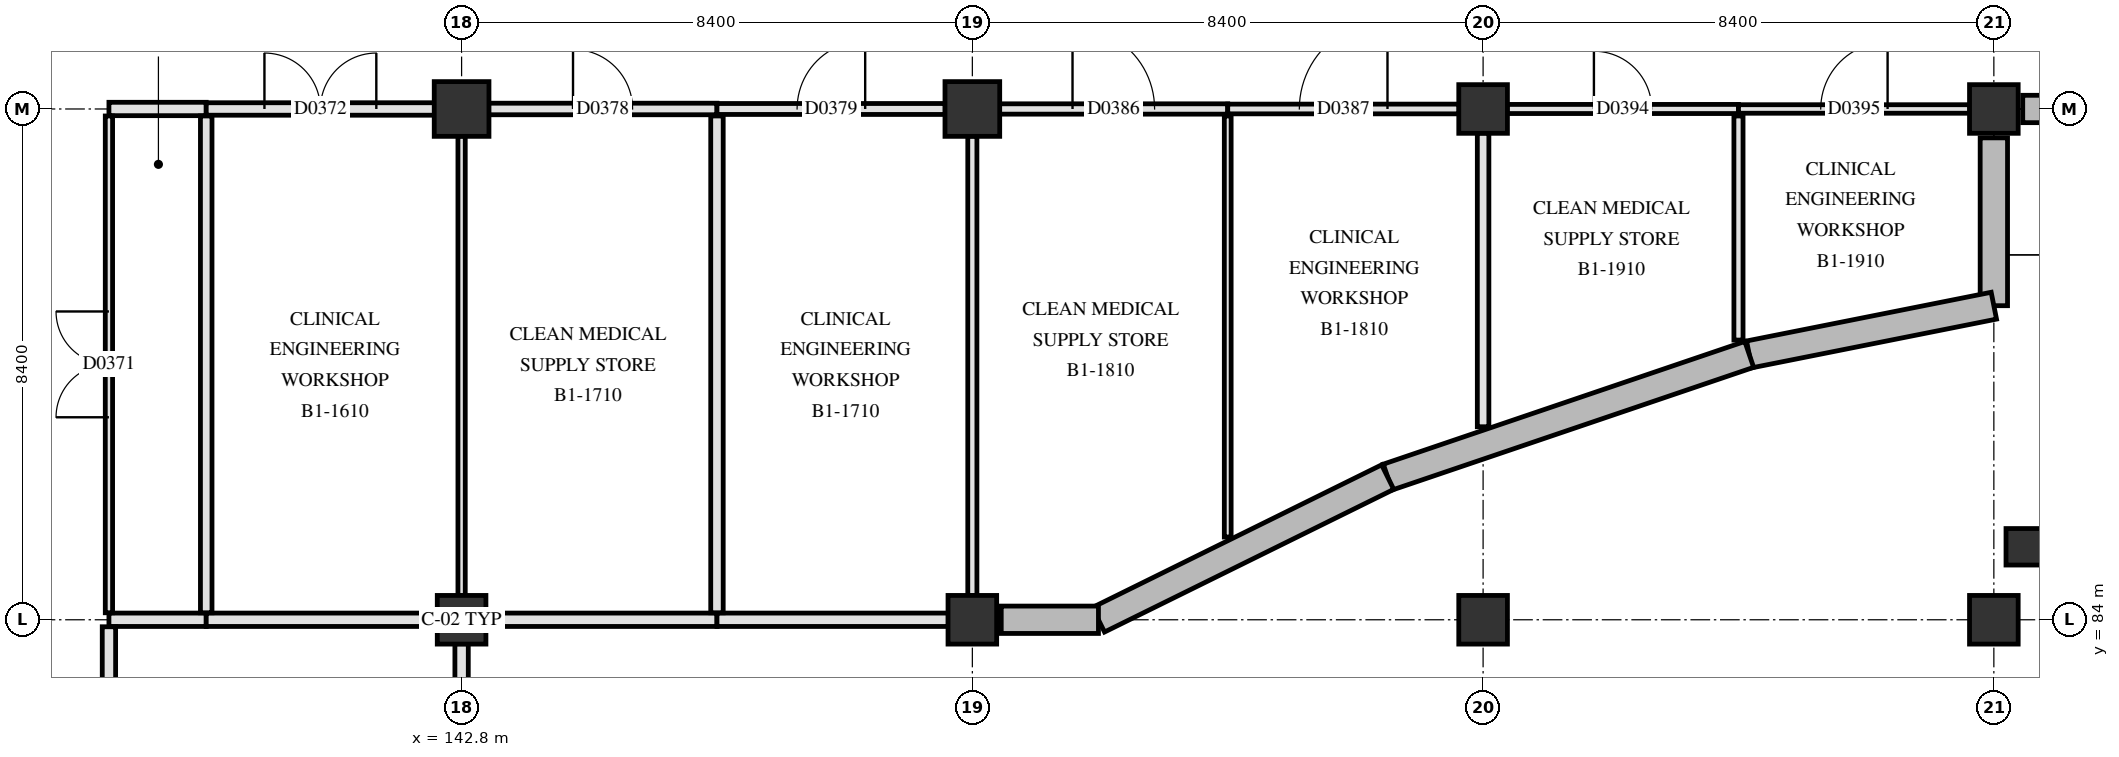
"""IFC4 building model, lengths in metres.
Left out: names, types, materials, properties, quantities, classifications, styles, units other than length and angle.
Written with IfcOpenShell. Run it as: python <this file> out.ifc"""

import sys

from ifc_helpers import new_model, si_unit, direction, frame, frame_2d, origin, origin_2d, place, context, subcontext, project, spatial, rectangle, extrude, element, fill, save


model = new_model("IFC4")
c1 = context("Model", 3, precision=1e-05, world=origin(), true_north=direction((0.0, 1.0)))
c2 = subcontext(c1, "Body", "Model", "MODEL_VIEW")
j1 = project(units=[si_unit("LENGTHUNIT", "METRE"), si_unit("PLANEANGLEUNIT", "RADIAN")], contexts=[c1])
p1 = place(None, origin())
s1 = spatial("IfcSite", under=j1, at=p1, CompositionType="ELEMENT")
p2 = place(p1, origin())
s2 = spatial("IfcBuilding", under=s1, at=p2, CompositionType="ELEMENT")
p3 = place(p2, frame((0.0, 0.0, -5.4)))
s3 = spatial("IfcBuildingStorey", under=s2, at=p3, CompositionType="ELEMENT", Elevation=-5.4)
p4 = place(p3, frame((142.8, 84.0, 0.0), z_axis=(0.0, 0.0, 1.0), x_axis=(1.0, 0.0, 0.0)))
e1 = element("IfcColumn", 1, at=p4, inside=s3, PredefinedType="COLUMN", context=c2, shape_type="SweptSolid", body=[
    extrude(rectangle(XDim=0.8, YDim=0.8, at=origin_2d()), origin(), (0.0, 0.0, 1.0), 5.4),
])
p5 = place(p3, frame((142.8, 92.4, 0.0), z_axis=(0.0, 0.0, 1.0), x_axis=(1.0, 0.0, 0.0)))
e2 = element("IfcColumn", 2, at=p5, inside=s3, PredefinedType="COLUMN", context=c2, shape_type="SweptSolid", body=[
    extrude(rectangle(XDim=0.9, YDim=0.9, at=origin_2d()), origin(), (0.0, 0.0, 1.0), 5.4),
])
p6 = place(p3, frame((151.2, 84.0, 0.0), z_axis=(0.0, 0.0, 1.0), x_axis=(1.0, 0.0, 0.0)))
e3 = element("IfcColumn", 3, at=p6, inside=s3, PredefinedType="COLUMN", context=c2, shape_type="SweptSolid", body=[
    extrude(rectangle(XDim=0.8, YDim=0.8, at=origin_2d()), origin(), (0.0, 0.0, 1.0), 5.4),
])
p7 = place(p3, frame((151.2, 92.4, 0.0), z_axis=(0.0, 0.0, 1.0), x_axis=(1.0, 0.0, 0.0)))
e4 = element("IfcColumn", 4, at=p7, inside=s3, PredefinedType="COLUMN", context=c2, shape_type="SweptSolid", body=[
    extrude(rectangle(XDim=0.9, YDim=0.9, at=origin_2d()), origin(), (0.0, 0.0, 1.0), 5.4),
])
for number, where, z_axis, x_axis in (
    (5, (159.6, 84.0, 0.0), (0.0, 0.0, 1.0), (1.0, 0.0, 0.0)),
    (6, (159.6, 92.4, 0.0), (0.0, 0.0, 1.0), (1.0, 0.0, 0.0)),
    (7, (168.0, 84.0, 0.0), (0.0, 0.0, 1.0), (1.0, 0.0, 0.0)),
    (8, (168.0, 92.4, 0.0), (0.0, 0.0, 1.0), (1.0, 0.0, 0.0)),
):
    element("IfcColumn", number, at=place(p3, frame(where, z_axis=z_axis, x_axis=x_axis)), inside=s3, PredefinedType="COLUMN", context=c2, shape_type="SweptSolid", body=[
        extrude(rectangle(XDim=0.8, YDim=0.8, at=origin_2d()), origin(), (0.0, 0.0, 1.0), 5.4),
    ])
p8 = place(p3, frame((175.925, 92.4, 0.0), z_axis=(0.0, 0.0, 1.0), x_axis=(-1.0, 0.0, 0.0)))
e9 = element("IfcWall", 9, at=p8, inside=s3, PredefinedType="SOLIDWALL", context=c2, shape_type="SweptSolid", body=[
    extrude(rectangle(XDim=7.45, YDim=0.45, at=frame_2d((3.725, 0.0))), origin(), (0.0, 0.0, 1.0), 5.08),
])
p9 = place(p3, frame((168.0, 91.925, 0.0), z_axis=(0.0, 0.0, 1.0), x_axis=(0.0, -1.0, 0.0)))
e10 = element("IfcWall", 10, at=p9, inside=s3, PredefinedType="SOLIDWALL", context=c2, shape_type="SweptSolid", body=[
    extrude(rectangle(XDim=2.76, YDim=0.45, at=frame_2d((1.38, 0.0))), origin(), (0.0, 0.0, 1.0), 5.08),
])
p10 = place(p3, frame((168.0, 89.165, 0.0), z_axis=(0.0, 0.0, 1.0), x_axis=(-0.980747429611, -0.195280514416, 0.0)))
e11 = element("IfcWall", 11, at=p10, inside=s3, PredefinedType="SOLIDWALL", context=c2, shape_type="SweptSolid", body=[
    extrude(rectangle(XDim=4.102, YDim=0.45, at=frame_2d((2.051, 0.0))), origin(), (0.0, 0.0, 1.0), 5.08),
])
p11 = place(p3, frame((163.977, 88.364, 0.0), z_axis=(0.0, 0.0, 1.0), x_axis=(-0.946946796994, -0.321390360253, 0.0)))
e12 = element("IfcWall", 12, at=p11, inside=s3, PredefinedType="SOLIDWALL", context=c2, shape_type="SweptSolid", body=[
    extrude(rectangle(XDim=6.279, YDim=0.45, at=frame_2d((3.14, 0.0))), origin(), (0.0, 0.0, 1.0), 5.08),
])
p12 = place(p3, frame((158.031, 86.346, 0.0), z_axis=(0.0, 0.0, 1.0), x_axis=(-0.896871620933, -0.442290962563, 0.0)))
e13 = element("IfcWall", 13, at=p12, inside=s3, PredefinedType="SOLIDWALL", context=c2, shape_type="SweptSolid", body=[
    extrude(rectangle(XDim=5.304, YDim=0.45, at=frame_2d((2.652, 0.0))), origin(), (0.0, 0.0, 1.0), 5.08),
])
p13 = place(p3, frame((153.274, 84.0, 0.0), z_axis=(0.0, 0.0, 1.0), x_axis=(-1.0, 0.0, 0.0)))
e14 = element("IfcWall", 14, at=p13, inside=s3, PredefinedType="SOLIDWALL", context=c2, shape_type="SweptSolid", body=[
    extrude(rectangle(XDim=1.599, YDim=0.45, at=frame_2d((0.799, 0.0))), origin(), (0.0, 0.0, 1.0), 5.08),
])
p14 = place(p3, frame((168.5, 85.2, 0.0), z_axis=(0.0, 0.0, 1.0), x_axis=(1.0, 0.0, 0.0)))
e15 = element("IfcColumn", 15, at=p14, inside=s3, PredefinedType="COLUMN", context=c2, shape_type="SweptSolid", body=[
    extrude(rectangle(XDim=0.6, YDim=0.6, at=origin_2d()), origin(), (0.0, 0.0, 1.0), 5.09),
])
p15 = place(p3, frame((137.0, 84.0, 0.0), z_axis=(0.0, 0.0, 1.0), x_axis=(1.0, 0.0, 0.0)))
e16 = element("IfcWall", 16, at=p15, inside=s3, PredefinedType="PARTITIONING", context=c2, shape_type="SweptSolid", body=[
    extrude(rectangle(XDim=1.6, YDim=0.22, at=frame_2d((0.8, 0.0))), origin(), (0.0, 0.0, 1.0), 4.42),
])
for number, where, z_axis, x_axis in (
    (17, (138.6, 84.0, 0.0), (0.0, 0.0, 1.0), (1.0, 0.0, 0.0)),
    (18, (143.195, 84.0, 0.0), (0.0, 0.0, 1.0), (1.0, 0.0, 0.0)),
    (19, (147.0, 84.0, 0.0), (0.0, 0.0, 1.0), (1.0, 0.0, 0.0)),
):
    element("IfcWall", number, at=place(p3, frame(where, z_axis=z_axis, x_axis=x_axis)), inside=s3, PredefinedType="PARTITIONING", context=c2, shape_type="SweptSolid", body=[
        extrude(rectangle(XDim=3.805, YDim=0.22, at=frame_2d((1.902, 0.0))), origin(), (0.0, 0.0, 1.0), 4.42),
    ])
p16 = place(p3, frame((137.0, 92.4, 0.0), z_axis=(0.0, 0.0, 1.0), x_axis=(1.0, 0.0, 0.0)))
e20 = element("IfcWall", 20, at=p16, inside=s3, PredefinedType="PARTITIONING", context=c2, shape_type="SweptSolid", body=[
    extrude(rectangle(XDim=1.6, YDim=0.22, at=frame_2d((0.8, 0.0))), origin(), (0.0, 0.0, 1.0), 4.42),
])
p17 = place(p3, frame((138.6, 92.4, 0.0), z_axis=(0.0, 0.0, 1.0), x_axis=(1.0, 0.0, 0.0)))
e21 = element("IfcWall", 21, at=p17, inside=s3, PredefinedType="PARTITIONING", context=c2, shape_type="SweptSolid", body=[
    extrude(rectangle(XDim=3.755, YDim=0.205, at=frame_2d((1.877, 0.0))), origin(), (0.0, 0.0, 1.0), 4.42),
])
p18 = place(p17, frame((0.958, 0.0, 0.0)))
e22 = element("IfcOpeningElement", 22, at=p18, cuts=e21, PredefinedType="OPENING", context=c2, shape_type="SweptSolid", body=[
    extrude(rectangle(XDim=1.84, YDim=2.28, at=frame_2d((0.92, 1.14))), frame((0.0, 0.113, 0.0), z_axis=(0.0, -1.0, 0.0), x_axis=(1.0, 0.0, 0.0)), (0.0, 0.0, 1.0), 0.225),
])
p19 = place(p3, frame((143.245, 92.4, 0.0), z_axis=(0.0, 0.0, 1.0), x_axis=(1.0, 0.0, 0.0)))
e23 = element("IfcWall", 23, at=p19, inside=s3, PredefinedType="PARTITIONING", context=c2, shape_type="SweptSolid", body=[
    extrude(rectangle(XDim=3.755, YDim=0.19, at=frame_2d((1.877, 0.0))), origin(), (0.0, 0.0, 1.0), 4.42),
])
p20 = place(p19, frame((1.387, 0.0, 0.0)))
e24 = element("IfcOpeningElement", 24, at=p20, cuts=e23, PredefinedType="OPENING", context=c2, shape_type="SweptSolid", body=[
    extrude(rectangle(XDim=0.98, YDim=2.12, at=frame_2d((0.49, 1.06))), frame((0.0, 0.105, 0.0), z_axis=(0.0, -1.0, 0.0), x_axis=(1.0, 0.0, 0.0)), (0.0, 0.0, 1.0), 0.21),
])
p21 = place(p3, frame((147.0, 92.4, 0.0), z_axis=(0.0, 0.0, 1.0), x_axis=(1.0, 0.0, 0.0)))
e25 = element("IfcWall", 25, at=p21, inside=s3, PredefinedType="PARTITIONING", context=c2, shape_type="SweptSolid", body=[
    extrude(rectangle(XDim=3.755, YDim=0.18, at=frame_2d((1.877, 0.0))), origin(), (0.0, 0.0, 1.0), 4.42),
])
p22 = place(p21, frame((1.317, 0.0, 0.0)))
e26 = element("IfcOpeningElement", 26, at=p22, cuts=e25, PredefinedType="OPENING", context=c2, shape_type="SweptSolid", body=[
    extrude(rectangle(XDim=1.12, YDim=2.18, at=frame_2d((0.56, 1.09))), frame((0.0, 0.1, 0.0), z_axis=(0.0, -1.0, 0.0), x_axis=(1.0, 0.0, 0.0)), (0.0, 0.0, 1.0), 0.2),
])
p23 = place(p3, frame((151.645, 92.4, 0.0), z_axis=(0.0, 0.0, 1.0), x_axis=(1.0, 0.0, 0.0)))
e27 = element("IfcWall", 27, at=p23, inside=s3, PredefinedType="PARTITIONING", context=c2, shape_type="SweptSolid", body=[
    extrude(rectangle(XDim=3.755, YDim=0.17, at=frame_2d((1.877, 0.0))), origin(), (0.0, 0.0, 1.0), 4.42),
])
p24 = place(p23, frame((1.202, 0.0, 0.0)))
e28 = element("IfcOpeningElement", 28, at=p24, cuts=e27, PredefinedType="OPENING", context=c2, shape_type="SweptSolid", body=[
    extrude(rectangle(XDim=1.35, YDim=2.2, at=frame_2d((0.675, 1.1))), frame((0.0, 0.095, 0.0), z_axis=(0.0, -1.0, 0.0), x_axis=(1.0, 0.0, 0.0)), (0.0, 0.0, 1.0), 0.19),
])
p25 = place(p3, frame((155.4, 92.4, 0.0), z_axis=(0.0, 0.0, 1.0), x_axis=(1.0, 0.0, 0.0)))
e29 = element("IfcWall", 29, at=p25, inside=s3, PredefinedType="PARTITIONING", context=c2, shape_type="SweptSolid", body=[
    extrude(rectangle(XDim=3.805, YDim=0.16, at=frame_2d((1.903, 0.0))), origin(), (0.0, 0.0, 1.0), 4.42),
])
p26 = place(p25, frame((1.177, 0.0, 0.0)))
e30 = element("IfcOpeningElement", 30, at=p26, cuts=e29, PredefinedType="OPENING", context=c2, shape_type="SweptSolid", body=[
    extrude(rectangle(XDim=1.45, YDim=2.2, at=frame_2d((0.725, 1.1))), frame((0.0, 0.09, 0.0), z_axis=(0.0, -1.0, 0.0), x_axis=(1.0, 0.0, 0.0)), (0.0, 0.0, 1.0), 0.18),
])
p27 = place(p3, frame((159.995, 92.4, 0.0), z_axis=(0.0, 0.0, 1.0), x_axis=(1.0, 0.0, 0.0)))
e31 = element("IfcWall", 31, at=p27, inside=s3, PredefinedType="PARTITIONING", context=c2, shape_type="SweptSolid", body=[
    extrude(rectangle(XDim=3.805, YDim=0.15, at=frame_2d((1.902, 0.0))), origin(), (0.0, 0.0, 1.0), 4.42),
])
p28 = place(p27, frame((1.427, 0.0, 0.0)))
e32 = element("IfcOpeningElement", 32, at=p28, cuts=e31, PredefinedType="OPENING", context=c2, shape_type="SweptSolid", body=[
    extrude(rectangle(XDim=0.95, YDim=2.1, at=frame_2d((0.475, 1.05))), frame((0.0, 0.085, 0.0), z_axis=(0.0, -1.0, 0.0), x_axis=(1.0, 0.0, 0.0)), (0.0, 0.0, 1.0), 0.17),
])
p29 = place(p3, frame((163.8, 92.4, 0.0), z_axis=(0.0, 0.0, 1.0), x_axis=(1.0, 0.0, 0.0)))
e33 = element("IfcWall", 33, at=p29, inside=s3, PredefinedType="PARTITIONING", context=c2, shape_type="SweptSolid", body=[
    extrude(rectangle(XDim=3.805, YDim=0.14, at=frame_2d((1.902, 0.0))), origin(), (0.0, 0.0, 1.0), 4.42),
])
p30 = place(p29, frame((1.353, 0.0, 0.0)))
e34 = element("IfcOpeningElement", 34, at=p30, cuts=e33, PredefinedType="OPENING", context=c2, shape_type="SweptSolid", body=[
    extrude(rectangle(XDim=1.1, YDim=2.15, at=frame_2d((0.55, 1.075))), frame((0.0, 0.08, 0.0), z_axis=(0.0, -1.0, 0.0), x_axis=(1.0, 0.0, 0.0)), (0.0, 0.0, 1.0), 0.16),
])
p31 = place(p3, frame((137.0, 78.315, 0.0), z_axis=(0.0, 0.0, 1.0), x_axis=(0.0, 1.0, 0.0)))
e35 = element("IfcWall", 35, at=p31, inside=s3, PredefinedType="PARTITIONING", context=c2, shape_type="SweptSolid", body=[
    extrude(rectangle(XDim=5.57, YDim=0.22, at=frame_2d((2.785, 0.0))), origin(), (0.0, 0.0, 1.0), 4.42),
])
p32 = place(p3, frame((137.0, 84.115, 0.0), z_axis=(0.0, 0.0, 1.0), x_axis=(0.0, 1.0, 0.0)))
e36 = element("IfcWall", 36, at=p32, inside=s3, PredefinedType="PARTITIONING", context=c2, shape_type="SweptSolid", body=[
    extrude(rectangle(XDim=8.17, YDim=0.12, at=frame_2d((4.085, 0.0))), origin(), (0.0, 0.0, 1.0), 4.42),
])
p33 = place(p32, frame((3.215, 0.0, 0.0)))
e37 = element("IfcOpeningElement", 37, at=p33, cuts=e36, PredefinedType="OPENING", context=c2, shape_type="SweptSolid", body=[
    extrude(rectangle(XDim=1.74, YDim=2.24, at=frame_2d((0.87, 1.12))), frame((0.0, 0.07, 0.0), z_axis=(0.0, -1.0, 0.0), x_axis=(1.0, 0.0, 0.0)), (0.0, 0.0, 1.0), 0.14),
])
p34 = place(p3, frame((138.6, 84.115, 0.0), z_axis=(0.0, 0.0, 1.0), x_axis=(0.0, 1.0, 0.0)))
e38 = element("IfcWall", 38, at=p34, inside=s3, PredefinedType="PARTITIONING", context=c2, shape_type="SweptSolid", body=[
    extrude(rectangle(XDim=8.17, YDim=0.19, at=frame_2d((4.085, 0.0))), origin(), (0.0, 0.0, 1.0), 4.42),
])
p35 = place(p3, frame((142.8, 78.315, 0.0), z_axis=(0.0, 0.0, 1.0), x_axis=(0.0, 1.0, 0.0)))
e39 = element("IfcWall", 39, at=p35, inside=s3, PredefinedType="PARTITIONING", context=c2, shape_type="SweptSolid", body=[
    extrude(rectangle(XDim=5.29, YDim=0.22, at=frame_2d((2.645, 0.0))), origin(), (0.0, 0.0, 1.0), 4.47),
])
p36 = place(p3, frame((142.8, 84.395, 0.0), z_axis=(0.0, 0.0, 1.0), x_axis=(0.0, 1.0, 0.0)))
e40 = element("IfcWall", 40, at=p36, inside=s3, PredefinedType="PARTITIONING", context=c2, shape_type="SweptSolid", body=[
    extrude(rectangle(XDim=7.56, YDim=0.12, at=frame_2d((3.78, 0.0))), origin(), (0.0, 0.0, 1.0), 4.47),
])
p37 = place(p3, frame((147.0, 84.115, 0.0), z_axis=(0.0, 0.0, 1.0), x_axis=(0.0, 1.0, 0.0)))
e41 = element("IfcWall", 41, at=p37, inside=s3, PredefinedType="PARTITIONING", context=c2, shape_type="SweptSolid", body=[
    extrude(rectangle(XDim=8.17, YDim=0.205, at=frame_2d((4.085, 0.0))), origin(), (0.0, 0.0, 1.0), 4.42),
])
p38 = place(p3, frame((151.2, 84.395, 0.0), z_axis=(0.0, 0.0, 1.0), x_axis=(0.0, 1.0, 0.0)))
e42 = element("IfcWall", 42, at=p38, inside=s3, PredefinedType="PARTITIONING", context=c2, shape_type="SweptSolid", body=[
    extrude(rectangle(XDim=7.56, YDim=0.15, at=frame_2d((3.78, 0.0))), origin(), (0.0, 0.0, 1.0), 4.47),
])
p39 = place(p3, frame((155.4, 85.361, 0.0), z_axis=(0.0, 0.0, 1.0), x_axis=(0.0, 1.0, 0.0)))
e43 = element("IfcWall", 43, at=p39, inside=s3, PredefinedType="PARTITIONING", context=c2, shape_type="SweptSolid", body=[
    extrude(rectangle(XDim=6.924, YDim=0.112, at=frame_2d((3.462, 0.0))), origin(), (0.0, 0.0, 1.0), 4.42),
])
p40 = place(p3, frame((159.6, 87.174, 0.0), z_axis=(0.0, 0.0, 1.0), x_axis=(0.0, 1.0, 0.0)))
e44 = element("IfcWall", 44, at=p40, inside=s3, PredefinedType="PARTITIONING", context=c2, shape_type="SweptSolid", body=[
    extrude(rectangle(XDim=4.831, YDim=0.19, at=frame_2d((2.415, 0.0))), origin(), (0.0, 0.0, 1.0), 4.47),
])
p41 = place(p3, frame((163.8, 88.6, 0.0), z_axis=(0.0, 0.0, 1.0), x_axis=(0.0, 1.0, 0.0)))
e45 = element("IfcWall", 45, at=p41, inside=s3, PredefinedType="PARTITIONING", context=c2, shape_type="SweptSolid", body=[
    extrude(rectangle(XDim=3.685, YDim=0.15, at=frame_2d((1.843, 0.0))), origin(), (0.0, 0.0, 1.0), 4.42),
])
p42 = place(p33, origin())
e46 = element("IfcDoor", 46, at=p42, inside=s3, OperationType="DOUBLE_SWING_RIGHT", PredefinedType="DOOR", context=c2, shape_type="SweptSolid", body=[
    extrude(rectangle(XDim=1.74, YDim=2.24, at=frame_2d((0.87, 1.12))), frame((0.0, 0.025, 0.0), z_axis=(0.0, -1.0, 0.0), x_axis=(1.0, 0.0, 0.0)), (0.0, 0.0, 1.0), 0.05),
])
fill(e37, e46)
p43 = place(p18, origin())
e47 = element("IfcDoor", 47, at=p43, inside=s3, OperationType="DOUBLE_SWING_LEFT", PredefinedType="DOOR", context=c2, shape_type="SweptSolid", body=[
    extrude(rectangle(XDim=1.84, YDim=2.28, at=frame_2d((0.92, 1.14))), frame((0.0, 0.025, 0.0), z_axis=(0.0, -1.0, 0.0), x_axis=(1.0, 0.0, 0.0)), (0.0, 0.0, 1.0), 0.05),
])
fill(e22, e47)
p44 = place(p20, origin())
e48 = element("IfcDoor", 48, at=p44, inside=s3, OperationType="SINGLE_SWING_LEFT", PredefinedType="DOOR", context=c2, shape_type="SweptSolid", body=[
    extrude(rectangle(XDim=0.98, YDim=2.12, at=frame_2d((0.49, 1.06))), frame((0.0, 0.025, 0.0), z_axis=(0.0, -1.0, 0.0), x_axis=(1.0, 0.0, 0.0)), (0.0, 0.0, 1.0), 0.05),
])
fill(e24, e48)
p45 = place(p22, origin())
e49 = element("IfcDoor", 49, at=p45, inside=s3, OperationType="SINGLE_SWING_RIGHT", PredefinedType="DOOR", context=c2, shape_type="SweptSolid", body=[
    extrude(rectangle(XDim=1.12, YDim=2.18, at=frame_2d((0.56, 1.09))), frame((0.0, 0.025, 0.0), z_axis=(0.0, -1.0, 0.0), x_axis=(1.0, 0.0, 0.0)), (0.0, 0.0, 1.0), 0.05),
])
fill(e26, e49)
p46 = place(p24, origin())
e50 = element("IfcDoor", 50, at=p46, inside=s3, OperationType="SINGLE_SWING_LEFT", PredefinedType="DOOR", context=c2, shape_type="SweptSolid", body=[
    extrude(rectangle(XDim=1.35, YDim=2.2, at=frame_2d((0.675, 1.1))), frame((0.0, 0.025, 0.0), z_axis=(0.0, -1.0, 0.0), x_axis=(1.0, 0.0, 0.0)), (0.0, 0.0, 1.0), 0.05),
])
fill(e28, e50)
p47 = place(p26, origin())
e51 = element("IfcDoor", 51, at=p47, inside=s3, OperationType="SINGLE_SWING_RIGHT", PredefinedType="DOOR", context=c2, shape_type="SweptSolid", body=[
    extrude(rectangle(XDim=1.45, YDim=2.2, at=frame_2d((0.725, 1.1))), frame((0.0, 0.025, 0.0), z_axis=(0.0, -1.0, 0.0), x_axis=(1.0, 0.0, 0.0)), (0.0, 0.0, 1.0), 0.05),
])
fill(e30, e51)
p48 = place(p28, origin())
e52 = element("IfcDoor", 52, at=p48, inside=s3, OperationType="SINGLE_SWING_LEFT", PredefinedType="DOOR", context=c2, shape_type="SweptSolid", body=[
    extrude(rectangle(XDim=0.95, YDim=2.1, at=frame_2d((0.475, 1.05))), frame((0.0, 0.025, 0.0), z_axis=(0.0, -1.0, 0.0), x_axis=(1.0, 0.0, 0.0)), (0.0, 0.0, 1.0), 0.05),
])
fill(e32, e52)
p49 = place(p30, origin())
e53 = element("IfcDoor", 53, at=p49, inside=s3, OperationType="SINGLE_SWING_RIGHT", PredefinedType="DOOR", context=c2, shape_type="SweptSolid", body=[
    extrude(rectangle(XDim=1.1, YDim=2.15, at=frame_2d((0.55, 1.075))), frame((0.0, 0.025, 0.0), z_axis=(0.0, -1.0, 0.0), x_axis=(1.0, 0.0, 0.0)), (0.0, 0.0, 1.0), 0.05),
])
fill(e34, e53)
save(model, sys.argv[1])
